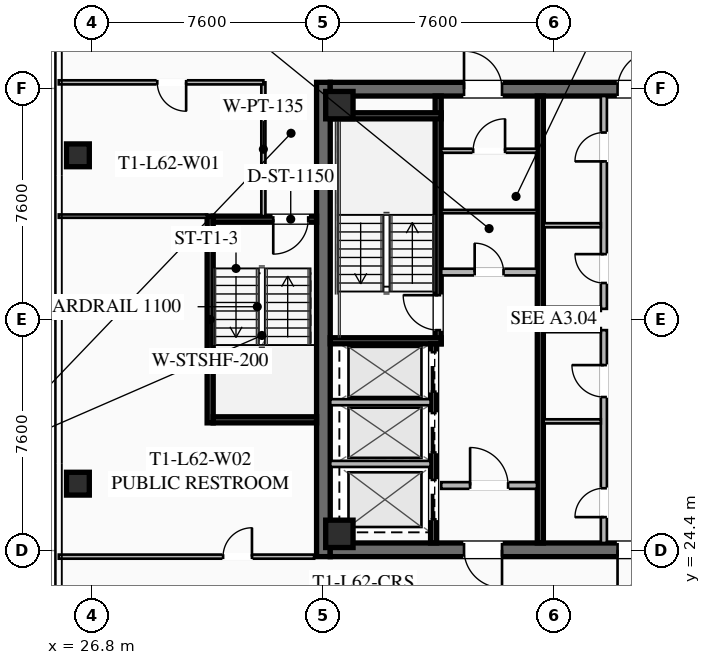
"""IFC4 building model, lengths in metres.
Left out: names, types, materials, properties, quantities, classifications, styles, units other than length and angle.
Written with IfcOpenShell. Run it as: python <this file> out.ifc"""

import sys

from ifc_helpers import new_model, si_unit, direction, frame, frame_2d, origin, origin_2d, place, context, subcontext, project, spatial, rectangle, hollow_rectangle, extrude, element, fill, save


model = new_model("IFC4")
c1 = context("Model", 3, precision=1e-05, world=origin(), true_north=direction((0.0, 1.0)))
c2 = subcontext(c1, "Body", "Model", "MODEL_VIEW")
j1 = project(units=[si_unit("LENGTHUNIT", "METRE"), si_unit("PLANEANGLEUNIT", "RADIAN")], contexts=[c1])
p1 = place(None, origin())
s1 = spatial("IfcSite", under=j1, at=p1, CompositionType="ELEMENT")
p2 = place(p1, origin())
s2 = spatial("IfcBuilding", under=s1, at=p2, CompositionType="ELEMENT")
p3 = place(p2, frame((0.0, 0.0, 229.05)))
s3 = spatial("IfcBuildingStorey", under=s2, at=p3, CompositionType="ELEMENT", Elevation=229.05)
p4 = place(p3, frame((34.425, 24.2, 0.0), z_axis=(0.0, 0.0, 1.0), x_axis=(0.0, 1.0, 0.0)))
e1 = element("IfcWall", 1, at=p4, inside=s3, PredefinedType="SHEAR", context=c2, shape_type="SweptSolid", body=[
    extrude(rectangle(XDim=15.6, YDim=0.45, at=frame_2d((7.8, 0.0))), origin(), (0.0, 0.0, 1.0), 3.55),
])
p5 = place(p3, frame((49.35, 24.425, 0.0), z_axis=(0.0, 0.0, 1.0), x_axis=(-1.0, 0.0, 0.0)))
e2 = element("IfcWall", 2, at=p5, inside=s3, PredefinedType="SHEAR", context=c2, shape_type="SweptSolid", body=[
    extrude(rectangle(XDim=14.7, YDim=0.45, at=frame_2d((7.35, 0.0))), origin(), (0.0, 0.0, 1.0), 3.55),
])
p6 = place(p5, frame((9.05, 0.0, 0.0)))
e3 = element("IfcOpeningElement", 3, at=p6, cuts=e2, PredefinedType="OPENING", context=c2, shape_type="SweptSolid", body=[
    extrude(rectangle(XDim=1.25, YDim=2.25, at=frame_2d((0.625, 1.125))), frame((0.0, 0.235, 0.0), z_axis=(0.0, -1.0, 0.0), x_axis=(1.0, 0.0, 0.0)), (0.0, 0.0, 1.0), 0.47),
])
p7 = place(p5, frame((4.0, 0.0, 0.0)))
e4 = element("IfcOpeningElement", 4, at=p7, cuts=e2, PredefinedType="OPENING", context=c2, shape_type="SweptSolid", body=[
    extrude(rectangle(XDim=1.25, YDim=2.25, at=frame_2d((0.625, 1.125))), frame((0.0, 0.235, 0.0), z_axis=(0.0, -1.0, 0.0), x_axis=(1.0, 0.0, 0.0)), (0.0, 0.0, 1.0), 0.47),
])
p8 = place(p3, frame((34.65, 39.575, 0.0), z_axis=(0.0, 0.0, 1.0), x_axis=(1.0, 0.0, 0.0)))
e5 = element("IfcWall", 5, at=p8, inside=s3, PredefinedType="SHEAR", context=c2, shape_type="SweptSolid", body=[
    extrude(rectangle(XDim=14.7, YDim=0.45, at=frame_2d((7.35, 0.0))), origin(), (0.0, 0.0, 1.0), 3.55),
])
p9 = place(p8, frame((4.4, 0.0, 0.0)))
e6 = element("IfcOpeningElement", 6, at=p9, cuts=e5, PredefinedType="OPENING", context=c2, shape_type="SweptSolid", body=[
    extrude(rectangle(XDim=1.25, YDim=2.25, at=frame_2d((0.625, 1.125))), frame((0.0, 0.235, 0.0), z_axis=(0.0, -1.0, 0.0), x_axis=(1.0, 0.0, 0.0)), (0.0, 0.0, 1.0), 0.47),
])
p10 = place(p8, frame((9.45, 0.0, 0.0)))
e7 = element("IfcOpeningElement", 7, at=p10, cuts=e5, PredefinedType="OPENING", context=c2, shape_type="SweptSolid", body=[
    extrude(rectangle(XDim=1.25, YDim=2.25, at=frame_2d((0.625, 1.125))), frame((0.0, 0.235, 0.0), z_axis=(0.0, -1.0, 0.0), x_axis=(1.0, 0.0, 0.0)), (0.0, 0.0, 1.0), 0.47),
])
for number, where, z_axis, x_axis in (
    (8, (34.95, 24.95, 0.0), (0.0, 0.0, 1.0), (1.0, 0.0, 0.0)),
    (9, (34.95, 39.05, 0.0), (0.0, 0.0, 1.0), (1.0, 0.0, 0.0)),
):
    element("IfcColumn", number, at=place(p3, frame(where, z_axis=z_axis, x_axis=x_axis)), inside=s3, PredefinedType="COLUMN", context=c2, shape_type="SweptSolid", body=[
        extrude(hollow_rectangle(XDim=0.9, YDim=0.9, WallThickness=0.04, at=origin_2d()), origin(), (0.0, 0.0, 1.0), 3.37),
    ])
for number, where, z_axis, x_axis in (
    (10, (26.35, 37.4, 0.0), (0.0, 0.0, 1.0), (1.0, 0.0, 0.0)),
    (11, (26.35, 26.6, 0.0), (0.0, 0.0, 1.0), (1.0, 0.0, 0.0)),
):
    element("IfcColumn", number, at=place(p3, frame(where, z_axis=z_axis, x_axis=x_axis)), inside=s3, PredefinedType="COLUMN", context=c2, shape_type="SweptSolid", body=[
        extrude(hollow_rectangle(XDim=0.75, YDim=0.75, WallThickness=0.032, at=origin_2d()), origin(), (0.0, 0.0, 1.0), 3.37),
    ])
p11 = place(p3, frame((38.2, 31.2, 0.0), z_axis=(0.0, 0.0, 1.0), x_axis=(0.0, 1.0, 0.0)))
e12 = element("IfcWall", 12, at=p11, inside=s3, PredefinedType="SHEAR", context=c2, shape_type="SweptSolid", body=[
    extrude(rectangle(XDim=8.15, YDim=0.2, at=frame_2d((4.075, 0.0))), origin(), (0.0, 0.0, 1.0), 3.37),
])
p12 = place(p11, frame((0.45, 0.0, 0.0)))
e13 = element("IfcOpeningElement", 13, at=p12, cuts=e12, PredefinedType="OPENING", context=c2, shape_type="SweptSolid", body=[
    extrude(rectangle(XDim=1.15, YDim=2.2, at=frame_2d((0.575, 1.1))), frame((0.0, 0.11, 0.0), z_axis=(0.0, -1.0, 0.0), x_axis=(1.0, 0.0, 0.0)), (0.0, 0.0, 1.0), 0.22),
])
for number, where, z_axis, x_axis in (
    (14, (34.65, 31.3, 0.0), (0.0, 0.0, 1.0), (1.0, 0.0, 0.0)),
    (15, (34.65, 38.7, 0.0), (0.0, 0.0, 1.0), (1.0, 0.0, 0.0)),
):
    element("IfcWall", number, at=place(p3, frame(where, z_axis=z_axis, x_axis=x_axis)), inside=s3, PredefinedType="SHEAR", context=c2, shape_type="SweptSolid", body=[
        extrude(rectangle(XDim=3.65, YDim=0.2, at=frame_2d((1.825, 0.0))), origin(), (0.0, 0.0, 1.0), 3.37),
    ])
p13 = place(p3, frame((41.56, 24.65, 0.0), z_axis=(0.0, 0.0, 1.0), x_axis=(0.0, 1.0, 0.0)))
e16 = element("IfcWall", 16, at=p13, inside=s3, PredefinedType="SHEAR", context=c2, shape_type="SweptSolid", body=[
    extrude(rectangle(XDim=14.7, YDim=0.2, at=frame_2d((7.35, 0.0))), origin(), (0.0, 0.0, 1.0), 3.37),
])
p14 = place(p3, frame((38.3, 33.56, 0.0), z_axis=(0.0, 0.0, 1.0), x_axis=(1.0, 0.0, 0.0)))
e17 = element("IfcWall", 17, at=p14, inside=s3, PredefinedType="SOLIDWALL", context=c2, shape_type="SweptSolid", body=[
    extrude(rectangle(XDim=3.15, YDim=0.22, at=frame_2d((1.575, 0.0))), origin(), (0.0, 0.0, 1.0), 2.513),
])
p15 = place(p14, frame((1.1, 0.0, 0.0)))
e18 = element("IfcOpeningElement", 18, at=p15, cuts=e17, PredefinedType="OPENING", context=c2, shape_type="SweptSolid", body=[
    extrude(rectangle(XDim=0.95, YDim=2.05, at=frame_2d((0.475, 1.025))), frame((0.0, 0.12, 0.0), z_axis=(0.0, -1.0, 0.0), x_axis=(1.0, 0.0, 0.0)), (0.0, 0.0, 1.0), 0.24),
])
p16 = place(p3, frame((38.3, 26.54, 0.0), z_axis=(0.0, 0.0, 1.0), x_axis=(1.0, 0.0, 0.0)))
e19 = element("IfcWall", 19, at=p16, inside=s3, PredefinedType="SOLIDWALL", context=c2, shape_type="SweptSolid", body=[
    extrude(rectangle(XDim=3.15, YDim=0.22, at=frame_2d((1.575, 0.0))), origin(), (0.0, 0.0, 1.0), 2.513),
])
p17 = place(p16, frame((0.95, 0.0, 0.0)))
e20 = element("IfcOpeningElement", 20, at=p17, cuts=e19, PredefinedType="OPENING", context=c2, shape_type="SweptSolid", body=[
    extrude(rectangle(XDim=1.25, YDim=2.25, at=frame_2d((0.625, 1.125))), frame((0.0, 0.12, 0.0), z_axis=(0.0, -1.0, 0.0), x_axis=(1.0, 0.0, 0.0)), (0.0, 0.0, 1.0), 0.24),
])
p18 = place(p3, frame((38.05, 24.65, 0.0), z_axis=(0.0, 0.0, 1.0), x_axis=(0.0, 1.0, 0.0)))
e21 = element("IfcWall", 21, at=p18, inside=s3, PredefinedType="SHEAR", context=c2, shape_type="SweptSolid", body=[
    extrude(rectangle(XDim=6.55, YDim=0.2, at=frame_2d((3.275, 0.0))), origin(), (0.0, 0.0, 1.0), 3.37),
])
p19 = place(p18, frame((4.975, 0.0, 0.0)))
e22 = element("IfcOpeningElement", 22, at=p19, cuts=e21, PredefinedType="OPENING", context=c2, shape_type="SweptSolid", body=[
    extrude(rectangle(XDim=1.3, YDim=2.25, at=frame_2d((0.65, 1.125))), frame((0.0, 0.11, 0.0), z_axis=(0.0, -1.0, 0.0), x_axis=(1.0, 0.0, 0.0)), (0.0, 0.0, 1.0), 0.22),
])
p20 = place(p18, frame((2.975, 0.0, 0.0)))
e23 = element("IfcOpeningElement", 23, at=p20, cuts=e21, PredefinedType="OPENING", context=c2, shape_type="SweptSolid", body=[
    extrude(rectangle(XDim=1.3, YDim=2.25, at=frame_2d((0.65, 1.125))), frame((0.0, 0.11, 0.0), z_axis=(0.0, -1.0, 0.0), x_axis=(1.0, 0.0, 0.0)), (0.0, 0.0, 1.0), 0.22),
])
p21 = place(p18, frame((0.775, 0.0, 0.0)))
e24 = element("IfcOpeningElement", 24, at=p21, cuts=e21, PredefinedType="OPENING", context=c2, shape_type="SweptSolid", body=[
    extrude(rectangle(XDim=1.3, YDim=2.25, at=frame_2d((0.65, 1.125))), frame((0.0, 0.11, 0.0), z_axis=(0.0, -1.0, 0.0), x_axis=(1.0, 0.0, 0.0)), (0.0, 0.0, 1.0), 0.22),
])
for number, where, z_axis, x_axis in (
    (25, (34.65, 27.25, 0.0), (0.0, 0.0, 1.0), (1.0, 0.0, 0.0)),
    (26, (34.65, 29.28, 0.0), (0.0, 0.0, 1.0), (1.0, 0.0, 0.0)),
):
    element("IfcWall", number, at=place(p3, frame(where, z_axis=z_axis, x_axis=x_axis)), inside=s3, PredefinedType="SOLIDWALL", context=c2, shape_type="SweptSolid", body=[
        extrude(rectangle(XDim=3.3, YDim=0.2, at=frame_2d((1.65, 0.0))), origin(), (0.0, 0.0, 1.0), 3.37),
    ])
p22 = place(p3, frame((38.3, 37.55, 0.0), z_axis=(0.0, 0.0, 1.0), x_axis=(1.0, 0.0, 0.0)))
e27 = element("IfcWall", 27, at=p22, inside=s3, PredefinedType="PARTITIONING", context=c2, shape_type="SweptSolid", body=[
    extrude(rectangle(XDim=3.15, YDim=0.135, at=frame_2d((1.575, 0.0))), origin(), (0.0, 0.0, 1.0), 2.513),
])
p23 = place(p22, frame((1.05, 0.0, 0.0)))
e28 = element("IfcOpeningElement", 28, at=p23, cuts=e27, PredefinedType="OPENING", context=c2, shape_type="SweptSolid", body=[
    extrude(rectangle(XDim=1.05, YDim=2.2, at=frame_2d((0.525, 1.1))), frame((0.0, 0.077, 0.0), z_axis=(0.0, -1.0, 0.0), x_axis=(1.0, 0.0, 0.0)), (0.0, 0.0, 1.0), 0.155),
])
p24 = place(p3, frame((38.3, 35.55, 0.0), z_axis=(0.0, 0.0, 1.0), x_axis=(1.0, 0.0, 0.0)))
e29 = element("IfcWall", 29, at=p24, inside=s3, PredefinedType="PARTITIONING", context=c2, shape_type="SweptSolid", body=[
    extrude(rectangle(XDim=3.15, YDim=0.11, at=frame_2d((1.575, 0.0))), origin(), (0.0, 0.0, 1.0), 2.513),
])
p25 = place(p3, frame((43.65, 24.65, 0.0), z_axis=(0.0, 0.0, 1.0), x_axis=(0.0, 1.0, 0.0)))
e30 = element("IfcWall", 30, at=p25, inside=s3, PredefinedType="SOLIDWALL", context=c2, shape_type="SweptSolid", body=[
    extrude(rectangle(XDim=7.0, YDim=0.2, at=frame_2d((3.5, 0.0))), origin(), (0.0, 0.0, 1.0), 2.513),
])
p26 = place(p25, frame((0.85, 0.0, 0.0)))
e31 = element("IfcOpeningElement", 31, at=p26, cuts=e30, PredefinedType="OPENING", context=c2, shape_type="SweptSolid", body=[
    extrude(rectangle(XDim=0.95, YDim=2.05, at=frame_2d((0.475, 1.025))), frame((0.0, 0.11, 0.0), z_axis=(0.0, -1.0, 0.0), x_axis=(1.0, 0.0, 0.0)), (0.0, 0.0, 1.0), 0.22),
])
p27 = place(p25, frame((4.8, 0.0, 0.0)))
e32 = element("IfcOpeningElement", 32, at=p27, cuts=e30, PredefinedType="OPENING", context=c2, shape_type="SweptSolid", body=[
    extrude(rectangle(XDim=1.05, YDim=2.2, at=frame_2d((0.525, 1.1))), frame((0.0, 0.11, 0.0), z_axis=(0.0, -1.0, 0.0), x_axis=(1.0, 0.0, 0.0)), (0.0, 0.0, 1.0), 0.22),
])
for number, where, z_axis, x_axis in (
    (33, (41.67, 31.65, 0.0), (0.0, 0.0, 1.0), (1.0, 0.0, 0.0)),
    (34, (41.67, 28.65, 0.0), (0.0, 0.0, 1.0), (1.0, 0.0, 0.0)),
):
    element("IfcWall", number, at=place(p3, frame(where, z_axis=z_axis, x_axis=x_axis)), inside=s3, PredefinedType="PARTITIONING", context=c2, shape_type="SweptSolid", body=[
        extrude(rectangle(XDim=1.88, YDim=0.135, at=frame_2d((0.94, 0.0))), origin(), (0.0, 0.0, 1.0), 2.513),
    ])
p28 = place(p3, frame((43.65, 32.35, 0.0), z_axis=(0.0, 0.0, 1.0), x_axis=(0.0, 1.0, 0.0)))
e35 = element("IfcWall", 35, at=p28, inside=s3, PredefinedType="SOLIDWALL", context=c2, shape_type="SweptSolid", body=[
    extrude(rectangle(XDim=7.0, YDim=0.2, at=frame_2d((3.5, 0.0))), origin(), (0.0, 0.0, 1.0), 2.513),
])
p29 = place(p28, frame((0.85, 0.0, 0.0)))
e36 = element("IfcOpeningElement", 36, at=p29, cuts=e35, PredefinedType="OPENING", context=c2, shape_type="SweptSolid", body=[
    extrude(rectangle(XDim=0.95, YDim=2.05, at=frame_2d((0.475, 1.025))), frame((0.0, 0.11, 0.0), z_axis=(0.0, -1.0, 0.0), x_axis=(1.0, 0.0, 0.0)), (0.0, 0.0, 1.0), 0.22),
])
p30 = place(p28, frame((4.85, 0.0, 0.0)))
e37 = element("IfcOpeningElement", 37, at=p30, cuts=e35, PredefinedType="OPENING", context=c2, shape_type="SweptSolid", body=[
    extrude(rectangle(XDim=0.95, YDim=2.05, at=frame_2d((0.475, 1.025))), frame((0.0, 0.11, 0.0), z_axis=(0.0, -1.0, 0.0), x_axis=(1.0, 0.0, 0.0)), (0.0, 0.0, 1.0), 0.22),
])
for number, where, z_axis, x_axis in (
    (38, (41.67, 32.35, 0.0), (0.0, 0.0, 1.0), (1.0, 0.0, 0.0)),
    (39, (41.67, 35.1, 0.0), (0.0, 0.0, 1.0), (1.0, 0.0, 0.0)),
):
    element("IfcWall", number, at=place(p3, frame(where, z_axis=z_axis, x_axis=x_axis)), inside=s3, PredefinedType="PARTITIONING", context=c2, shape_type="SweptSolid", body=[
        extrude(rectangle(XDim=1.88, YDim=0.135, at=frame_2d((0.94, 0.0))), origin(), (0.0, 0.0, 1.0), 2.513),
    ])
p31 = place(p3, frame((30.7, 28.6, 0.0), z_axis=(0.0, 0.0, 1.0), x_axis=(0.0, 1.0, 0.0)))
e40 = element("IfcWall", 40, at=p31, inside=s3, PredefinedType="SHEAR", context=c2, shape_type="SweptSolid", body=[
    extrude(rectangle(XDim=6.8, YDim=0.2, at=frame_2d((3.4, 0.0))), origin(), (0.0, 0.0, 1.0), 3.37),
])
p32 = place(p3, frame((34.2, 35.3, 0.0), z_axis=(0.0, 0.0, 1.0), x_axis=(-1.0, 0.0, 0.0)))
e41 = element("IfcWall", 41, at=p32, inside=s3, PredefinedType="SHEAR", context=c2, shape_type="SweptSolid", body=[
    extrude(rectangle(XDim=3.4, YDim=0.2, at=frame_2d((1.7, 0.0))), origin(), (0.0, 0.0, 1.0), 3.37),
])
p33 = place(p32, frame((0.275, 0.0, 0.0)))
e42 = element("IfcOpeningElement", 42, at=p33, cuts=e41, PredefinedType="OPENING", context=c2, shape_type="SweptSolid", body=[
    extrude(rectangle(XDim=1.15, YDim=2.2, at=frame_2d((0.575, 1.1))), frame((0.0, 0.11, 0.0), z_axis=(0.0, -1.0, 0.0), x_axis=(1.0, 0.0, 0.0)), (0.0, 0.0, 1.0), 0.22),
])
p34 = place(p3, frame((30.8, 28.7, 0.0), z_axis=(0.0, 0.0, 1.0), x_axis=(1.0, 0.0, 0.0)))
e43 = element("IfcWall", 43, at=p34, inside=s3, PredefinedType="SHEAR", context=c2, shape_type="SweptSolid", body=[
    extrude(rectangle(XDim=3.4, YDim=0.2, at=frame_2d((1.7, 0.0))), origin(), (0.0, 0.0, 1.0), 3.37),
])
p35 = place(p3, frame((32.45, 35.4, 0.0), z_axis=(0.0, 0.0, 1.0), x_axis=(0.0, 1.0, 0.0)))
e44 = element("IfcWall", 44, at=p35, inside=s3, PredefinedType="PARTITIONING", context=c2, shape_type="SweptSolid", body=[
    extrude(rectangle(XDim=4.4, YDim=0.135, at=frame_2d((2.2, 0.0))), origin(), (0.0, 0.0, 1.0), 2.513),
])
p36 = place(p3, frame((32.45, 39.8, 0.0), z_axis=(0.0, 0.0, 1.0), x_axis=(-1.0, 0.0, 0.0)))
e45 = element("IfcWall", 45, at=p36, inside=s3, PredefinedType="PARTITIONING", context=c2, shape_type="SweptSolid", body=[
    extrude(rectangle(XDim=6.73, YDim=0.135, at=frame_2d((3.365, 0.0))), origin(), (0.0, 0.0, 1.0), 2.513),
])
p37 = place(p36, frame((2.54, 0.0, 0.0)))
e46 = element("IfcOpeningElement", 46, at=p37, cuts=e45, PredefinedType="OPENING", context=c2, shape_type="SweptSolid", body=[
    extrude(rectangle(XDim=0.95, YDim=2.05, at=frame_2d((0.475, 1.025))), frame((0.0, 0.077, 0.0), z_axis=(0.0, -1.0, 0.0), x_axis=(1.0, 0.0, 0.0)), (0.0, 0.0, 1.0), 0.155),
])
p38 = place(p3, frame((25.72, 24.2, 0.0), z_axis=(0.0, 0.0, 1.0), x_axis=(1.0, 0.0, 0.0)))
e47 = element("IfcWall", 47, at=p38, inside=s3, PredefinedType="PARTITIONING", context=c2, shape_type="SweptSolid", body=[
    extrude(rectangle(XDim=8.4, YDim=0.135, at=frame_2d((4.2, 0.0))), origin(), (0.0, 0.0, 1.0), 2.513),
])
p39 = place(p38, frame((5.405, 0.0, 0.0)))
e48 = element("IfcOpeningElement", 48, at=p39, cuts=e47, PredefinedType="OPENING", context=c2, shape_type="SweptSolid", body=[
    extrude(rectangle(XDim=0.95, YDim=2.05, at=frame_2d((0.475, 1.025))), frame((0.0, 0.077, 0.0), z_axis=(0.0, -1.0, 0.0), x_axis=(1.0, 0.0, 0.0)), (0.0, 0.0, 1.0), 0.155),
])
p40 = place(p3, frame((30.6, 35.4, 0.0), z_axis=(0.0, 0.0, 1.0), x_axis=(-1.0, 0.0, 0.0)))
e49 = element("IfcWall", 49, at=p40, inside=s3, PredefinedType="PARTITIONING", context=c2, shape_type="SweptSolid", body=[
    extrude(rectangle(XDim=4.88, YDim=0.11, at=frame_2d((2.44, 0.0))), origin(), (0.0, 0.0, 1.0), 2.513),
])
p41 = place(p9, origin())
e50 = element("IfcDoor", 50, at=p41, inside=s3, OperationType="SINGLE_SWING_LEFT", PredefinedType="DOOR", context=c2, shape_type="SweptSolid", body=[
    extrude(rectangle(XDim=1.25, YDim=2.25, at=frame_2d((0.625, 1.125))), frame((0.0, 0.025, 0.0), z_axis=(0.0, -1.0, 0.0), x_axis=(1.0, 0.0, 0.0)), (0.0, 0.0, 1.0), 0.05),
])
fill(e6, e50)
p42 = place(p10, origin())
e51 = element("IfcDoor", 51, at=p42, inside=s3, OperationType="SINGLE_SWING_RIGHT", PredefinedType="DOOR", context=c2, shape_type="SweptSolid", body=[
    extrude(rectangle(XDim=1.25, YDim=2.25, at=frame_2d((0.625, 1.125))), frame((0.0, 0.025, 0.0), z_axis=(0.0, -1.0, 0.0), x_axis=(1.0, 0.0, 0.0)), (0.0, 0.0, 1.0), 0.05),
])
fill(e7, e51)
p43 = place(p6, origin())
e52 = element("IfcDoor", 52, at=p43, inside=s3, OperationType="SINGLE_SWING_LEFT", PredefinedType="DOOR", context=c2, shape_type="SweptSolid", body=[
    extrude(rectangle(XDim=1.25, YDim=2.25, at=frame_2d((0.625, 1.125))), frame((0.0, 0.025, 0.0), z_axis=(0.0, -1.0, 0.0), x_axis=(1.0, 0.0, 0.0)), (0.0, 0.0, 1.0), 0.05),
])
fill(e3, e52)
p44 = place(p7, origin())
e53 = element("IfcDoor", 53, at=p44, inside=s3, OperationType="SINGLE_SWING_RIGHT", PredefinedType="DOOR", context=c2, shape_type="SweptSolid", body=[
    extrude(rectangle(XDim=1.25, YDim=2.25, at=frame_2d((0.625, 1.125))), frame((0.0, 0.025, 0.0), z_axis=(0.0, -1.0, 0.0), x_axis=(1.0, 0.0, 0.0)), (0.0, 0.0, 1.0), 0.05),
])
fill(e4, e53)
p45 = place(p12, origin())
e54 = element("IfcDoor", 54, at=p45, inside=s3, OperationType="SINGLE_SWING_RIGHT", PredefinedType="DOOR", context=c2, shape_type="SweptSolid", body=[
    extrude(rectangle(XDim=1.15, YDim=2.2, at=frame_2d((0.575, 1.1))), frame((0.0, 0.025, 0.0), z_axis=(0.0, -1.0, 0.0), x_axis=(1.0, 0.0, 0.0)), (0.0, 0.0, 1.0), 0.05),
])
fill(e13, e54)
p46 = place(p17, origin())
e55 = element("IfcDoor", 55, at=p46, inside=s3, OperationType="SINGLE_SWING_LEFT", PredefinedType="DOOR", context=c2, shape_type="SweptSolid", body=[
    extrude(rectangle(XDim=1.25, YDim=2.25, at=frame_2d((0.625, 1.125))), frame((0.0, 0.025, 0.0), z_axis=(0.0, -1.0, 0.0), x_axis=(1.0, 0.0, 0.0)), (0.0, 0.0, 1.0), 0.05),
])
fill(e20, e55)
p47 = place(p23, origin())
e56 = element("IfcDoor", 56, at=p47, inside=s3, OperationType="SINGLE_SWING_RIGHT", PredefinedType="DOOR", context=c2, shape_type="SweptSolid", body=[
    extrude(rectangle(XDim=1.05, YDim=2.2, at=frame_2d((0.525, 1.1))), frame((0.0, 0.025, 0.0), z_axis=(0.0, -1.0, 0.0), x_axis=(1.0, 0.0, 0.0)), (0.0, 0.0, 1.0), 0.05),
])
fill(e28, e56)
p48 = place(p15, origin())
e57 = element("IfcDoor", 57, at=p48, inside=s3, OperationType="SINGLE_SWING_LEFT", PredefinedType="DOOR", context=c2, shape_type="SweptSolid", body=[
    extrude(rectangle(XDim=0.95, YDim=2.05, at=frame_2d((0.475, 1.025))), frame((0.0, 0.025, 0.0), z_axis=(0.0, -1.0, 0.0), x_axis=(1.0, 0.0, 0.0)), (0.0, 0.0, 1.0), 0.05),
])
fill(e18, e57)
p49 = place(p26, origin())
e58 = element("IfcDoor", 58, at=p49, inside=s3, OperationType="SINGLE_SWING_LEFT", PredefinedType="DOOR", context=c2, shape_type="SweptSolid", body=[
    extrude(rectangle(XDim=0.95, YDim=2.05, at=frame_2d((0.475, 1.025))), frame((0.0, 0.025, 0.0), z_axis=(0.0, -1.0, 0.0), x_axis=(1.0, 0.0, 0.0)), (0.0, 0.0, 1.0), 0.05),
])
fill(e31, e58)
p50 = place(p27, origin())
e59 = element("IfcDoor", 59, at=p50, inside=s3, OperationType="SINGLE_SWING_RIGHT", PredefinedType="DOOR", context=c2, shape_type="SweptSolid", body=[
    extrude(rectangle(XDim=1.05, YDim=2.2, at=frame_2d((0.525, 1.1))), frame((0.0, 0.025, 0.0), z_axis=(0.0, -1.0, 0.0), x_axis=(1.0, 0.0, 0.0)), (0.0, 0.0, 1.0), 0.05),
])
fill(e32, e59)
p51 = place(p29, origin())
e60 = element("IfcDoor", 60, at=p51, inside=s3, OperationType="SINGLE_SWING_RIGHT", PredefinedType="DOOR", context=c2, shape_type="SweptSolid", body=[
    extrude(rectangle(XDim=0.95, YDim=2.05, at=frame_2d((0.475, 1.025))), frame((0.0, 0.025, 0.0), z_axis=(0.0, -1.0, 0.0), x_axis=(1.0, 0.0, 0.0)), (0.0, 0.0, 1.0), 0.05),
])
fill(e36, e60)
p52 = place(p30, origin())
e61 = element("IfcDoor", 61, at=p52, inside=s3, OperationType="SINGLE_SWING_LEFT", PredefinedType="DOOR", context=c2, shape_type="SweptSolid", body=[
    extrude(rectangle(XDim=0.95, YDim=2.05, at=frame_2d((0.475, 1.025))), frame((0.0, 0.025, 0.0), z_axis=(0.0, -1.0, 0.0), x_axis=(1.0, 0.0, 0.0)), (0.0, 0.0, 1.0), 0.05),
])
fill(e37, e61)
p53 = place(p33, origin())
e62 = element("IfcDoor", 62, at=p53, inside=s3, OperationType="SINGLE_SWING_RIGHT", PredefinedType="DOOR", context=c2, shape_type="SweptSolid", body=[
    extrude(rectangle(XDim=1.15, YDim=2.2, at=frame_2d((0.575, 1.1))), frame((0.0, 0.025, 0.0), z_axis=(0.0, -1.0, 0.0), x_axis=(1.0, 0.0, 0.0)), (0.0, 0.0, 1.0), 0.05),
])
fill(e42, e62)
p54 = place(p37, origin())
e63 = element("IfcDoor", 63, at=p54, inside=s3, OperationType="SINGLE_SWING_LEFT", PredefinedType="DOOR", context=c2, shape_type="SweptSolid", body=[
    extrude(rectangle(XDim=0.95, YDim=2.05, at=frame_2d((0.475, 1.025))), frame((0.0, 0.025, 0.0), z_axis=(0.0, -1.0, 0.0), x_axis=(1.0, 0.0, 0.0)), (0.0, 0.0, 1.0), 0.05),
])
fill(e46, e63)
p55 = place(p39, origin())
e64 = element("IfcDoor", 64, at=p55, inside=s3, OperationType="SINGLE_SWING_RIGHT", PredefinedType="DOOR", context=c2, shape_type="SweptSolid", body=[
    extrude(rectangle(XDim=0.95, YDim=2.05, at=frame_2d((0.475, 1.025))), frame((0.0, 0.025, 0.0), z_axis=(0.0, -1.0, 0.0), x_axis=(1.0, 0.0, 0.0)), (0.0, 0.0, 1.0), 0.05),
])
fill(e48, e64)
p56 = place(p19, origin())
e65 = element("IfcDoor", 65, at=p56, inside=s3, OperationType="SLIDING_TO_LEFT", PredefinedType="DOOR", context=c2, shape_type="SweptSolid", body=[
    extrude(rectangle(XDim=1.3, YDim=2.25, at=frame_2d((0.65, 1.125))), frame((0.0, 0.025, 0.0), z_axis=(0.0, -1.0, 0.0), x_axis=(1.0, 0.0, 0.0)), (0.0, 0.0, 1.0), 0.05),
])
fill(e22, e65)
p57 = place(p20, origin())
e66 = element("IfcDoor", 66, at=p57, inside=s3, OperationType="SLIDING_TO_LEFT", PredefinedType="DOOR", context=c2, shape_type="SweptSolid", body=[
    extrude(rectangle(XDim=1.3, YDim=2.25, at=frame_2d((0.65, 1.125))), frame((0.0, 0.025, 0.0), z_axis=(0.0, -1.0, 0.0), x_axis=(1.0, 0.0, 0.0)), (0.0, 0.0, 1.0), 0.05),
])
fill(e23, e66)
p58 = place(p21, origin())
e67 = element("IfcDoor", 67, at=p58, inside=s3, OperationType="SLIDING_TO_LEFT", PredefinedType="DOOR", context=c2, shape_type="SweptSolid", body=[
    extrude(rectangle(XDim=1.3, YDim=2.25, at=frame_2d((0.65, 1.125))), frame((0.0, 0.025, 0.0), z_axis=(0.0, -1.0, 0.0), x_axis=(1.0, 0.0, 0.0)), (0.0, 0.0, 1.0), 0.05),
])
fill(e24, e67)
save(model, sys.argv[1])
